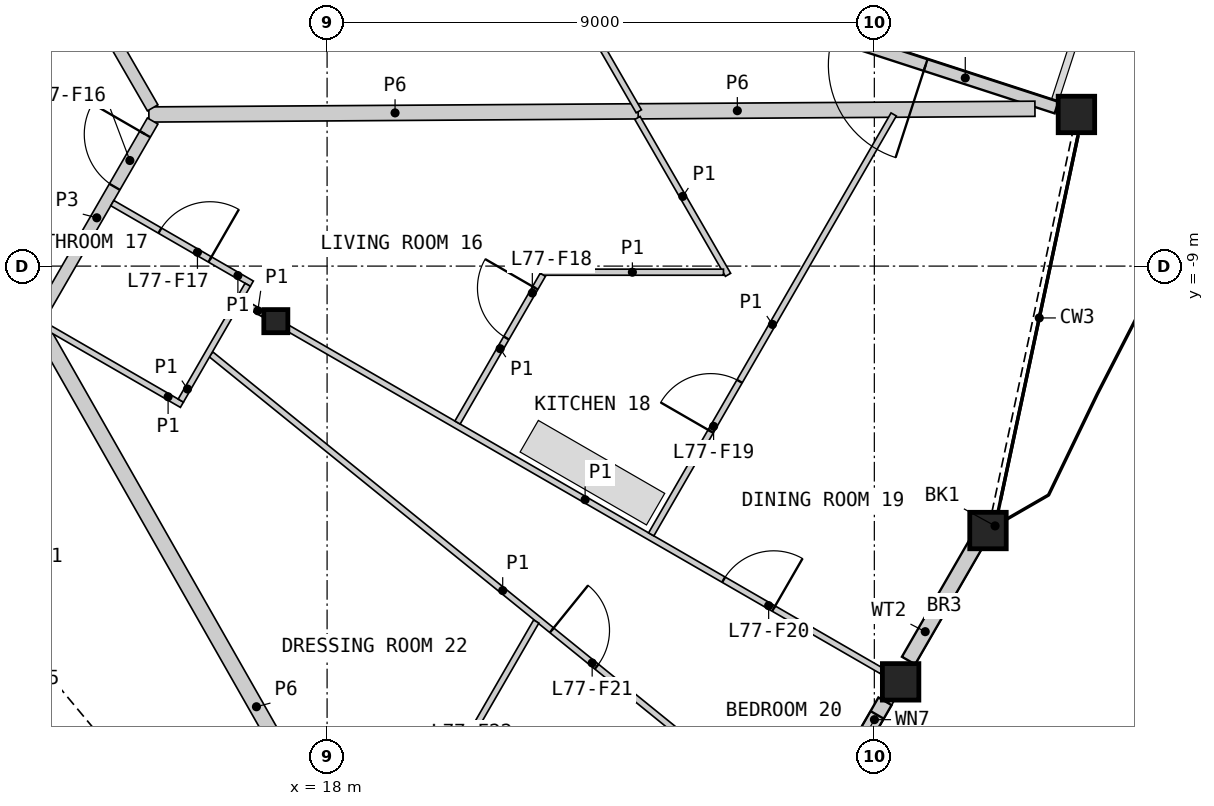
"""IFC4 building model, lengths in metres.
Left out: names, types, materials, properties, quantities, classifications, styles, units other than length and angle.
Written with IfcOpenShell. Run it as: python <this file> out.ifc"""

import sys

from ifc_helpers import new_model, si_unit, direction, frame, frame_2d, origin, origin_2d, place, context, subcontext, project, spatial, rectangle, hollow_rectangle, i_section, extrude, element, fill, save


model = new_model("IFC4")
c1 = context("Model", 3, precision=1e-05, world=origin(), true_north=direction((0.0, 1.0)))
c2 = subcontext(c1, "Body", "Model", "MODEL_VIEW")
j1 = project(units=[si_unit("LENGTHUNIT", "METRE"), si_unit("PLANEANGLEUNIT", "RADIAN")], contexts=[c1])
p1 = place(None, origin())
s1 = spatial("IfcSite", under=j1, at=p1, CompositionType="ELEMENT")
p2 = place(p1, origin())
s2 = spatial("IfcBuilding", under=s1, at=p2, CompositionType="ELEMENT")
p3 = place(p2, frame((0.0, 0.0, 342.6)))
s3 = spatial("IfcBuildingStorey", under=s2, at=p3, CompositionType="ELEMENT", Elevation=342.6)
for number, where, z_axis, x_axis in (
    (1, (27.432, -15.838, 0.0), (0.0, 0.0, 1.0), (1.0, 0.0, 0.0)),
    (2, (28.869, -13.349, 0.0), (0.0, 0.0, 1.0), (1.0, 0.0, 0.0)),
    (3, (30.324, -6.506, 0.0), (0.0, 0.0, 1.0), (1.0, 0.0, 0.0)),
):
    element("IfcColumn", number, at=place(p3, frame(where, z_axis=z_axis, x_axis=x_axis)), inside=s3, PredefinedType="COLUMN", context=c2, shape_type="SweptSolid", body=[
        extrude(hollow_rectangle(XDim=0.6, YDim=0.6, WallThickness=0.04, at=origin_2d()), origin(), (0.0, 0.0, 1.0), 3.4),
    ])
p4 = place(p3, frame((17.157, -9.906, 0.0), z_axis=(0.0, 0.0, 1.0), x_axis=(1.0, 0.0, 0.0)))
e4 = element("IfcColumn", 4, at=p4, inside=s3, PredefinedType="COLUMN", context=c2, shape_type="SweptSolid", body=[
    extrude(i_section(OverallWidth=0.396, OverallDepth=0.381, WebThickness=0.019, FlangeThickness=0.03, at=origin_2d()), origin(), (0.0, 0.0, 1.0), 3.4),
])
p5 = place(p3, frame((26.096, -18.027, 0.0), z_axis=(0.0, 0.0, 1.0), x_axis=(0.499983569942, 0.866034889475, 0.0)))
e5 = element("IfcWall", 5, at=p5, inside=s3, PredefinedType="SOLIDWALL", context=c2, shape_type="SweptSolid", body=[
    extrude(rectangle(XDim=2.158, YDim=0.25, at=frame_2d((1.079, 0.0))), origin(), (0.0, 0.0, 1.0), 2.488),
])
p6 = place(p5, frame((1.0, 0.0, 1.6)))
e6 = element("IfcOpeningElement", 6, at=p6, cuts=e5, PredefinedType="OPENING", context=c2, shape_type="SweptSolid", body=[
    extrude(rectangle(XDim=0.9, YDim=0.6, at=frame_2d((0.45, 0.3))), frame((0.0, 0.135, 0.0), z_axis=(0.0, -1.0, 0.0), x_axis=(1.0, 0.0, 0.0)), (0.0, 0.0, 1.0), 0.27),
])
p7 = place(p3, frame((27.562, -15.488, 0.0), z_axis=(0.0, 0.0, 1.0), x_axis=(0.500049712553, 0.865996700326, 0.0)))
e7 = element("IfcWall", 7, at=p7, inside=s3, PredefinedType="SOLIDWALL", context=c2, shape_type="SweptSolid", body=[
    extrude(rectangle(XDim=2.196, YDim=0.25, at=frame_2d((1.098, 0.0))), origin(), (0.0, 0.0, 1.0), 2.488),
])
p8 = place(p3, frame((29.996, -6.393, 0.0), z_axis=(0.0, 0.0, 1.0), x_axis=(-0.951051127664, 0.309033578383, 0.0)))
e8 = element("IfcWall", 8, at=p8, inside=s3, PredefinedType="SOLIDWALL", context=c2, shape_type="SweptSolid", body=[
    extrude(rectangle(XDim=6.31, YDim=0.2, at=frame_2d((3.155, 0.0))), origin(), (0.0, 0.0, 1.0), 2.488),
])
p9 = place(p8, frame((2.263, 0.0, 0.0)))
e9 = element("IfcOpeningElement", 9, at=p9, cuts=e8, PredefinedType="OPENING", context=c2, shape_type="SweptSolid", body=[
    extrude(rectangle(XDim=1.6, YDim=2.25, at=frame_2d((0.8, 1.125))), frame((0.0, 0.11, 0.0), z_axis=(0.0, -1.0, 0.0), x_axis=(1.0, 0.0, 0.0)), (0.0, 0.0, 1.0), 0.22),
])
p10 = place(p3, frame((13.169, -9.797, 0.0), z_axis=(0.0, 0.0, 1.0), x_axis=(0.494414335079, -0.869226360201, 0.0)))
e10 = element("IfcWall", 10, at=p10, inside=s3, PredefinedType="PARTITIONING", context=c2, shape_type="SweptSolid", body=[
    extrude(rectangle(XDim=14.842, YDim=0.25, at=frame_2d((7.421, 0.0))), origin(), (0.0, 0.0, 1.0), 2.33),
])
p11 = place(p3, frame((15.069, -6.506, 0.0), z_axis=(0.0, 0.0, 1.0), x_axis=(0.999979186485, 0.006451867641, 0.0)))
e11 = element("IfcWall", 11, at=p11, inside=s3, PredefinedType="PARTITIONING", context=c2, shape_type="SweptSolid", body=[
    extrude(rectangle(XDim=8.098, YDim=0.25, at=frame_2d((4.049, 0.0))), origin(), (0.0, 0.0, 1.0), 2.33),
])
p12 = place(p3, frame((23.115, -6.455, 0.0), z_axis=(0.0, 0.0, 1.0), x_axis=(0.999979299397, 0.006434343627, 0.0)))
e12 = element("IfcWall", 12, at=p12, inside=s3, PredefinedType="PARTITIONING", context=c2, shape_type="SweptSolid", body=[
    extrude(rectangle(XDim=6.526, YDim=0.25, at=frame_2d((3.263, 0.0))), origin(), (0.0, 0.0, 1.0), 2.33),
])
p13 = place(p3, frame((12.988, -2.684, 0.0), z_axis=(0.0, 0.0, 1.0), x_axis=(0.500003406062, -0.866023437285, 0.0)))
e13 = element("IfcWall", 13, at=p13, inside=s3, PredefinedType="PARTITIONING", context=c2, shape_type="SweptSolid", body=[
    extrude(rectangle(XDim=4.288, YDim=0.2, at=frame_2d((2.144, 0.0))), origin(), (0.0, 0.0, 1.0), 3.1),
])
p14 = place(p3, frame((13.293, -9.797, 0.0), z_axis=(0.0, 0.0, 1.0), x_axis=(0.499967746641, 0.866044024469, 0.0)))
e14 = element("IfcWall", 14, at=p14, inside=s3, PredefinedType="PARTITIONING", context=c2, shape_type="SweptSolid", body=[
    extrude(rectangle(XDim=3.676, YDim=0.2, at=frame_2d((1.838, 0.0))), origin(), (0.0, 0.0, 1.0), 3.1),
])
p15 = place(p14, frame((2.426, 0.0, 0.0)))
e15 = element("IfcOpeningElement", 15, at=p15, cuts=e14, PredefinedType="OPENING", context=c2, shape_type="SweptSolid", body=[
    extrude(rectangle(XDim=1.0, YDim=2.1, at=frame_2d((0.5, 1.05))), frame((0.0, 0.11, 0.0), z_axis=(0.0, -1.0, 0.0), x_axis=(1.0, 0.0, 0.0)), (0.0, 0.0, 1.0), 0.22),
])
p16 = place(p3, frame((16.091, -10.451, 0.0), z_axis=(0.0, 0.0, 1.0), x_axis=(0.77714308631, -0.629323941544, 0.0)))
e16 = element("IfcWall", 16, at=p16, inside=s3, PredefinedType="PARTITIONING", context=c2, shape_type="SweptSolid", body=[
    extrude(rectangle(XDim=12.346, YDim=0.1, at=frame_2d((6.173, 0.0))), origin(), (0.0, 0.0, 1.0), 2.33),
])
p17 = place(p16, frame((7.211, 0.0, 0.0)))
e17 = element("IfcOpeningElement", 17, at=p17, cuts=e16, PredefinedType="OPENING", context=c2, shape_type="SweptSolid", body=[
    extrude(rectangle(XDim=0.95, YDim=2.1, at=frame_2d((0.475, 1.05))), frame((0.0, 0.06, 0.0), z_axis=(0.0, -1.0, 0.0), x_axis=(1.0, 0.0, 0.0)), (0.0, 0.0, 1.0), 0.12),
])
p18 = place(p3, frame((17.365, -10.025, 0.0), z_axis=(0.0, 0.0, 1.0), x_axis=(0.866021046153, -0.500007547564, 0.0)))
e18 = element("IfcWall", 18, at=p18, inside=s3, PredefinedType="PARTITIONING", context=c2, shape_type="SweptSolid", body=[
    extrude(rectangle(XDim=11.267, YDim=0.1, at=frame_2d((5.634, 0.0))), origin(), (0.0, 0.0, 1.0), 2.33),
])
p19 = place(p18, frame((8.264, 0.0, 0.0)))
e19 = element("IfcOpeningElement", 19, at=p19, cuts=e18, PredefinedType="OPENING", context=c2, shape_type="SweptSolid", body=[
    extrude(rectangle(XDim=0.95, YDim=2.1, at=frame_2d((0.475, 1.05))), frame((0.0, 0.06, 0.0), z_axis=(0.0, -1.0, 0.0), x_axis=(1.0, 0.0, 0.0)), (0.0, 0.0, 1.0), 0.12),
])
p20 = place(p3, frame((23.331, -13.412, 0.0), z_axis=(0.0, 0.0, 1.0), x_axis=(0.499994510044, 0.866028573389, 0.0)))
e20 = element("IfcWall", 20, at=p20, inside=s3, PredefinedType="PARTITIONING", context=c2, shape_type="SweptSolid", body=[
    extrude(rectangle(XDim=7.975, YDim=0.1, at=frame_2d((3.988, 0.0))), origin(), (0.0, 0.0, 1.0), 2.33),
])
p21 = place(p20, frame((1.957, 0.0, 0.0)))
e21 = element("IfcOpeningElement", 21, at=p21, cuts=e20, PredefinedType="OPENING", context=c2, shape_type="SweptSolid", body=[
    extrude(rectangle(XDim=0.95, YDim=2.1, at=frame_2d((0.475, 1.05))), frame((0.0, 0.06, 0.0), z_axis=(0.0, -1.0, 0.0), x_axis=(1.0, 0.0, 0.0)), (0.0, 0.0, 1.0), 0.12),
])
p22 = place(p3, frame((19.773, -0.645, 0.0), z_axis=(0.0, 0.0, 1.0), x_axis=(0.499998644583, -0.866026186333, 0.0)))
e22 = element("IfcWall", 22, at=p22, inside=s3, PredefinedType="PARTITIONING", context=c2, shape_type="SweptSolid", body=[
    extrude(rectangle(XDim=6.708, YDim=0.1, at=frame_2d((3.354, 0.0))), origin(), (0.0, 0.0, 1.0), 2.33),
])
p23 = place(p22, frame((2.475, 0.0, 0.0)))
e23 = element("IfcOpeningElement", 23, at=p23, cuts=e22, PredefinedType="OPENING", context=c2, shape_type="SweptSolid", body=[
    extrude(rectangle(XDim=0.95, YDim=2.1, at=frame_2d((0.475, 1.05))), frame((0.0, 0.06, 0.0), z_axis=(0.0, -1.0, 0.0), x_axis=(1.0, 0.0, 0.0)), (0.0, 0.0, 1.0), 0.12),
])
p24 = place(p3, frame((18.761, -19.485, 0.0), z_axis=(0.0, 0.0, 1.0), x_axis=(0.500031527488, 0.866007200615, 0.0)))
e24 = element("IfcWall", 24, at=p24, inside=s3, PredefinedType="PARTITIONING", context=c2, shape_type="SweptSolid", body=[
    extrude(rectangle(XDim=5.356, YDim=0.1, at=frame_2d((2.678, 0.0))), origin(), (0.0, 0.0, 1.0), 2.33),
])
p25 = place(p24, frame((1.752, 0.0, 0.0)))
e25 = element("IfcOpeningElement", 25, at=p25, cuts=e24, PredefinedType="OPENING", context=c2, shape_type="SweptSolid", body=[
    extrude(rectangle(XDim=0.95, YDim=2.1, at=frame_2d((0.475, 1.05))), frame((0.0, 0.06, 0.0), z_axis=(0.0, -1.0, 0.0), x_axis=(1.0, 0.0, 0.0)), (0.0, 0.0, 1.0), 0.12),
])
p26 = place(p3, frame((23.104, -6.563, 0.0), z_axis=(0.0, 0.0, 1.0), x_axis=(0.499999078476, -0.866025935826, 0.0)))
e26 = element("IfcWall", 26, at=p26, inside=s3, PredefinedType="PARTITIONING", context=c2, shape_type="SweptSolid", body=[
    extrude(rectangle(XDim=2.979, YDim=0.1, at=frame_2d((1.49, 0.0))), origin(), (0.0, 0.0, 1.0), 2.33),
])
p27 = place(p3, frame((21.523, -9.1, 0.0), z_axis=(0.0, 0.0, 1.0), x_axis=(1.0, 0.0, 0.0)))
e27 = element("IfcWall", 27, at=p27, inside=s3, PredefinedType="PARTITIONING", context=c2, shape_type="SweptSolid", body=[
    extrude(rectangle(XDim=2.996, YDim=0.1, at=frame_2d((1.498, 0.0))), origin(), (0.0, 0.0, 1.0), 2.33),
])
p28 = place(p3, frame((20.145, -11.573, 0.0), z_axis=(0.0, 0.0, 1.0), x_axis=(0.49998612769, 0.866033412818, 0.0)))
e28 = element("IfcWall", 28, at=p28, inside=s3, PredefinedType="PARTITIONING", context=c2, shape_type="SweptSolid", body=[
    extrude(rectangle(XDim=2.805, YDim=0.1, at=frame_2d((1.403, 0.0))), origin(), (0.0, 0.0, 1.0), 2.33),
])
p29 = place(p28, frame((1.605, 0.0, 0.0)))
e29 = element("IfcOpeningElement", 29, at=p29, cuts=e28, PredefinedType="OPENING", context=c2, shape_type="SweptSolid", body=[
    extrude(rectangle(XDim=0.95, YDim=2.1, at=frame_2d((0.475, 1.05))), frame((0.0, 0.06, 0.0), z_axis=(0.0, -1.0, 0.0), x_axis=(1.0, 0.0, 0.0)), (0.0, 0.0, 1.0), 0.12),
])
p30 = place(p3, frame((14.468, -7.964, 0.0), z_axis=(0.0, 0.0, 1.0), x_axis=(0.865989200783, -0.500062700197, 0.0)))
e30 = element("IfcWall", 30, at=p30, inside=s3, PredefinedType="PARTITIONING", context=c2, shape_type="SweptSolid", body=[
    extrude(rectangle(XDim=2.65, YDim=0.1, at=frame_2d((1.325, 0.0))), origin(), (0.0, 0.0, 1.0), 2.33),
])
p31 = place(p30, frame((0.905, 0.0, 0.0)))
e31 = element("IfcOpeningElement", 31, at=p31, cuts=e30, PredefinedType="OPENING", context=c2, shape_type="SweptSolid", body=[
    extrude(rectangle(XDim=0.95, YDim=2.1, at=frame_2d((0.475, 1.05))), frame((0.0, 0.06, 0.0), z_axis=(0.0, -1.0, 0.0), x_axis=(1.0, 0.0, 0.0)), (0.0, 0.0, 1.0), 0.12),
])
p32 = place(p3, frame((13.339, -9.968, 0.0), z_axis=(0.0, 0.0, 1.0), x_axis=(0.866036909293, -0.499980071345, 0.0)))
e32 = element("IfcWall", 32, at=p32, inside=s3, PredefinedType="PARTITIONING", context=c2, shape_type="SweptSolid", body=[
    extrude(rectangle(XDim=2.625, YDim=0.1, at=frame_2d((1.312, 0.0))), origin(), (0.0, 0.0, 1.0), 2.33),
])
p33 = place(p3, frame((15.594, -11.212, 0.0), z_axis=(0.0, 0.0, 1.0), x_axis=(0.499898558967, 0.866083962871, 0.0)))
e33 = element("IfcWall", 33, at=p33, inside=s3, PredefinedType="PARTITIONING", context=c2, shape_type="SweptSolid", body=[
    extrude(rectangle(XDim=2.2, YDim=0.1, at=frame_2d((1.1, 0.0))), origin(), (0.0, 0.0, 1.0), 2.33),
])
p34 = place(p3, frame((16.594, -9.581, 0.0), z_axis=(0.0, 0.0, 1.0), x_axis=(0.866036909293, -0.499980071345, 0.0)))
e34 = element("IfcWall", 34, at=p34, inside=s3, PredefinedType="PARTITIONING", context=c2, shape_type="SweptSolid", body=[
    extrude(rectangle(XDim=0.41, YDim=0.1, at=frame_2d((0.205, 0.0))), origin(), (0.0, 0.0, 1.0), 2.33),
])
p35 = place(p6, origin())
e35 = element("IfcWindow", 35, at=p35, inside=s3, PartitioningType="SINGLE_PANEL", PredefinedType="WINDOW", context=c2, shape_type="SweptSolid", body=[
    extrude(rectangle(XDim=0.9, YDim=0.6, at=frame_2d((0.45, 0.3))), frame((0.0, 0.03, 0.0), z_axis=(0.0, -1.0, 0.0), x_axis=(1.0, 0.0, 0.0)), (0.0, 0.0, 1.0), 0.06),
])
fill(e6, e35)
p36 = place(p9, origin())
e36 = element("IfcDoor", 36, at=p36, inside=s3, OperationType="DOUBLE_DOOR_SINGLE_SWING", PredefinedType="DOOR", context=c2, shape_type="SweptSolid", body=[
    extrude(rectangle(XDim=1.6, YDim=2.25, at=frame_2d((0.8, 1.125))), frame((0.0, 0.025, 0.0), z_axis=(0.0, -1.0, 0.0), x_axis=(1.0, 0.0, 0.0)), (0.0, 0.0, 1.0), 0.05),
])
fill(e9, e36)
p37 = place(p15, origin())
e37 = element("IfcDoor", 37, at=p37, inside=s3, OperationType="SINGLE_SWING_RIGHT", PredefinedType="DOOR", context=c2, shape_type="SweptSolid", body=[
    extrude(rectangle(XDim=1.0, YDim=2.1, at=frame_2d((0.5, 1.05))), frame((0.0, 0.025, 0.0), z_axis=(0.0, -1.0, 0.0), x_axis=(1.0, 0.0, 0.0)), (0.0, 0.0, 1.0), 0.05),
])
fill(e15, e37)
p38 = place(p31, origin())
e38 = element("IfcDoor", 38, at=p38, inside=s3, OperationType="SINGLE_SWING_RIGHT", PredefinedType="DOOR", context=c2, shape_type="SweptSolid", body=[
    extrude(rectangle(XDim=0.95, YDim=2.1, at=frame_2d((0.475, 1.05))), frame((0.0, 0.025, 0.0), z_axis=(0.0, -1.0, 0.0), x_axis=(1.0, 0.0, 0.0)), (0.0, 0.0, 1.0), 0.05),
])
fill(e31, e38)
p39 = place(p29, origin())
e39 = element("IfcDoor", 39, at=p39, inside=s3, OperationType="SINGLE_SWING_RIGHT", PredefinedType="DOOR", context=c2, shape_type="SweptSolid", body=[
    extrude(rectangle(XDim=0.95, YDim=2.1, at=frame_2d((0.475, 1.05))), frame((0.0, 0.025, 0.0), z_axis=(0.0, -1.0, 0.0), x_axis=(1.0, 0.0, 0.0)), (0.0, 0.0, 1.0), 0.05),
])
fill(e29, e39)
p40 = place(p21, origin())
e40 = element("IfcDoor", 40, at=p40, inside=s3, OperationType="SINGLE_SWING_LEFT", PredefinedType="DOOR", context=c2, shape_type="SweptSolid", body=[
    extrude(rectangle(XDim=0.95, YDim=2.1, at=frame_2d((0.475, 1.05))), frame((0.0, 0.025, 0.0), z_axis=(0.0, -1.0, 0.0), x_axis=(1.0, 0.0, 0.0)), (0.0, 0.0, 1.0), 0.05),
])
fill(e21, e40)
p41 = place(p19, origin())
e41 = element("IfcDoor", 41, at=p41, inside=s3, OperationType="SINGLE_SWING_RIGHT", PredefinedType="DOOR", context=c2, shape_type="SweptSolid", body=[
    extrude(rectangle(XDim=0.95, YDim=2.1, at=frame_2d((0.475, 1.05))), frame((0.0, 0.025, 0.0), z_axis=(0.0, -1.0, 0.0), x_axis=(1.0, 0.0, 0.0)), (0.0, 0.0, 1.0), 0.05),
])
fill(e19, e41)
p42 = place(p17, origin())
e42 = element("IfcDoor", 42, at=p42, inside=s3, OperationType="SINGLE_SWING_LEFT", PredefinedType="DOOR", context=c2, shape_type="SweptSolid", body=[
    extrude(rectangle(XDim=0.95, YDim=2.1, at=frame_2d((0.475, 1.05))), frame((0.0, 0.025, 0.0), z_axis=(0.0, -1.0, 0.0), x_axis=(1.0, 0.0, 0.0)), (0.0, 0.0, 1.0), 0.05),
])
fill(e17, e42)
save(model, sys.argv[1])
